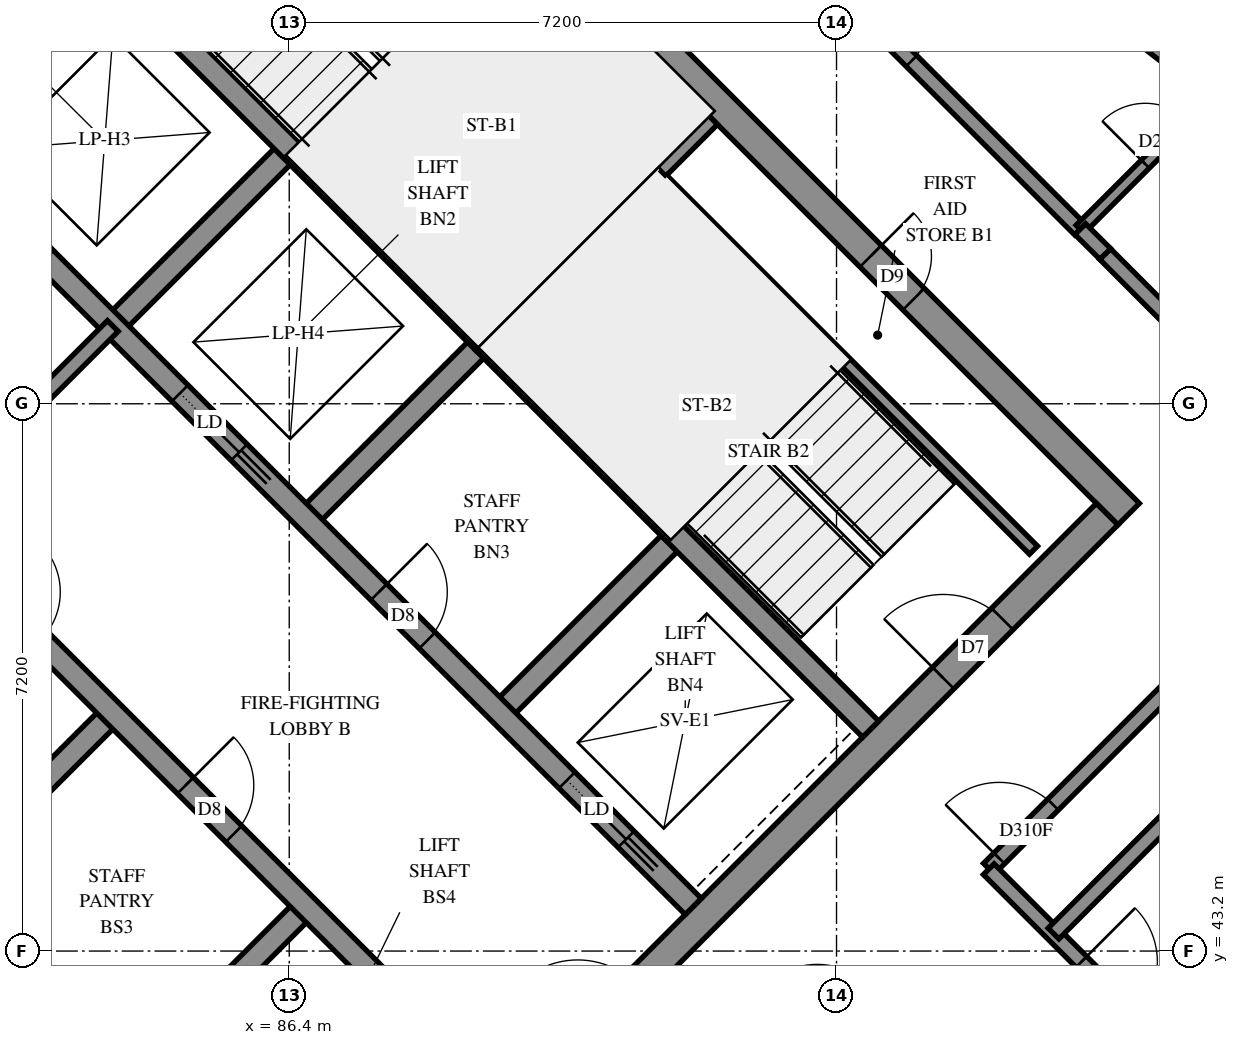
"""IFC4 building model, lengths in metres.
Left out: names, types, materials, properties, quantities, classifications, styles, units other than length and angle.
Written with IfcOpenShell. Run it as: python <this file> out.ifc"""

import sys

from ifc_helpers import new_model, si_unit, direction, frame, frame_2d, origin, place, context, subcontext, project, spatial, polyline, rectangle, outline, extrude, element, fill, save


model = new_model("IFC4")
c1 = context("Model", 3, precision=1e-05, world=origin(), true_north=direction((0.0, 1.0)))
c2 = subcontext(c1, "Body", "Model", "MODEL_VIEW")
j1 = project(units=[si_unit("LENGTHUNIT", "METRE"), si_unit("PLANEANGLEUNIT", "RADIAN")], contexts=[c1])
p1 = place(None, origin())
s1 = spatial("IfcSite", under=j1, at=p1, CompositionType="ELEMENT")
p2 = place(p1, origin())
s2 = spatial("IfcBuilding", under=s1, at=p2, CompositionType="ELEMENT")
p3 = place(p2, frame((0.0, 0.0, 257.4)))
s3 = spatial("IfcBuildingStorey", under=s2, at=p3, CompositionType="ELEMENT", Elevation=257.4)
p4 = place(p3, frame((76.23, 49.231, -0.3), z_axis=(0.0, 0.0, 1.0), x_axis=(0.7071034917, -0.7071100706, 0.0)))
e1 = element("IfcWall", 1, at=p4, inside=s3, PredefinedType="SHEAR", context=c2, shape_type="SweptSolid", body=[
    extrude(rectangle(XDim=15.2, YDim=0.4, at=frame_2d((7.6, 0.0))), origin(), (0.0, 0.0, 1.0), 2.7),
])
p5 = place(p3, frame((86.695, 59.696, -0.3), z_axis=(0.0, 0.0, 1.0), x_axis=(0.7071100706, -0.7071034917, 0.0)))
e2 = element("IfcWall", 2, at=p5, inside=s3, PredefinedType="SHEAR", context=c2, shape_type="SweptSolid", body=[
    extrude(rectangle(XDim=15.2, YDim=0.4, at=frame_2d((7.6, 0.0))), origin(), (0.0, 0.0, 1.0), 2.7),
])
p6 = place(p5, frame((10.4, 0.0, 0.3)))
e3 = element("IfcOpeningElement", 3, at=p6, cuts=e2, PredefinedType="OPENING", context=c2, shape_type="SweptSolid", body=[
    extrude(rectangle(XDim=0.8, YDim=2.1, at=frame_2d((0.4, 1.05))), frame((0.0, 0.21, 0.0), z_axis=(0.0, -1.0, 0.0), x_axis=(1.0, 0.0, 0.0)), (0.0, 0.0, 1.0), 0.42),
])
p7 = place(p3, frame((76.513, 49.231, -0.3), z_axis=(0.0, 0.0, 1.0), x_axis=(0.7071067812, 0.7071067812, 0.0)))
e4 = element("IfcWall", 4, at=p7, inside=s3, PredefinedType="SHEAR", context=c2, shape_type="SweptSolid", body=[
    extrude(rectangle(XDim=14.4, YDim=0.4, at=frame_2d((7.2, 0.0))), origin(), (0.0, 0.0, 1.0), 2.7),
])
p8 = place(p7, frame((4.55, 0.0, 0.3)))
e5 = element("IfcOpeningElement", 5, at=p8, cuts=e4, PredefinedType="OPENING", context=c2, shape_type="SweptSolid", body=[
    extrude(rectangle(XDim=1.1, YDim=2.1, at=frame_2d((0.55, 1.05))), frame((0.0, 0.21, 0.0), z_axis=(0.0, -1.0, 0.0), x_axis=(1.0, 0.0, 0.0)), (0.0, 0.0, 1.0), 0.42),
])
p9 = place(p7, frame((11.35, 0.0, 0.3)))
e6 = element("IfcOpeningElement", 6, at=p9, cuts=e4, PredefinedType="OPENING", context=c2, shape_type="SweptSolid", body=[
    extrude(rectangle(XDim=1.1, YDim=2.1, at=frame_2d((0.55, 1.05))), frame((0.0, 0.21, 0.0), z_axis=(0.0, -1.0, 0.0), x_axis=(1.0, 0.0, 0.0)), (0.0, 0.0, 1.0), 0.42),
])
p10 = place(p3, frame((86.978, 38.766, -0.3), z_axis=(0.0, 0.0, 1.0), x_axis=(0.7071067812, 0.7071067812, 0.0)))
e7 = element("IfcWall", 7, at=p10, inside=s3, PredefinedType="SHEAR", context=c2, shape_type="SweptSolid", body=[
    extrude(rectangle(XDim=14.4, YDim=0.4, at=frame_2d((7.2, 0.0))), origin(), (0.0, 0.0, 1.0), 2.7),
])
p11 = place(p10, frame((4.55, 0.0, 0.3)))
e8 = element("IfcOpeningElement", 8, at=p11, cuts=e7, PredefinedType="OPENING", context=c2, shape_type="SweptSolid", body=[
    extrude(rectangle(XDim=1.1, YDim=2.1, at=frame_2d((0.55, 1.05))), frame((0.0, 0.21, 0.0), z_axis=(0.0, -1.0, 0.0), x_axis=(1.0, 0.0, 0.0)), (0.0, 0.0, 1.0), 0.42),
])
p12 = place(p10, frame((11.35, 0.0, 0.3)))
e9 = element("IfcOpeningElement", 9, at=p12, cuts=e7, PredefinedType="OPENING", context=c2, shape_type="SweptSolid", body=[
    extrude(rectangle(XDim=1.1, YDim=2.1, at=frame_2d((0.55, 1.05))), frame((0.0, 0.21, 0.0), z_axis=(0.0, -1.0, 0.0), x_axis=(1.0, 0.0, 0.0)), (0.0, 0.0, 1.0), 0.42),
])
p13 = place(p3, frame((84.079, 51.423, 0.0), z_axis=(0.0, 0.0, 1.0), x_axis=(0.7071219326, 0.7070916295, 0.0)))
e10 = element("IfcWall", 10, at=p13, inside=s3, PredefinedType="SOLIDWALL", context=c2, shape_type="SweptSolid", body=[
    extrude(rectangle(XDim=3.3, YDim=0.3, at=frame_2d((1.65, 0.0))), origin(), (0.0, 0.0, 1.0), 3.1),
])
p14 = place(p3, frame((81.746, 43.999, 0.0), z_axis=(0.0, 0.0, 1.0), x_axis=(0.7071067812, 0.7071067812, 0.0)))
e11 = element("IfcWall", 11, at=p14, inside=s3, PredefinedType="SOLIDWALL", context=c2, shape_type="SweptSolid", body=[
    extrude(rectangle(XDim=3.3, YDim=0.3, at=frame_2d((1.65, 0.0))), origin(), (0.0, 0.0, 1.0), 3.1),
])
p15 = place(p3, frame((86.625, 48.878, 0.0), z_axis=(0.0, 0.0, 1.0), x_axis=(0.7071067812, 0.7071067812, 0.0)))
e12 = element("IfcWall", 12, at=p15, inside=s3, PredefinedType="SOLIDWALL", context=c2, shape_type="SweptSolid", body=[
    extrude(rectangle(XDim=3.3, YDim=0.3, at=frame_2d((1.65, 0.0))), origin(), (0.0, 0.0, 1.0), 3.1),
])
p16 = place(p3, frame((84.291, 41.453, 0.0), z_axis=(0.0, 0.0, 1.0), x_axis=(0.7071067812, 0.7071067812, 0.0)))
e13 = element("IfcWall", 13, at=p16, inside=s3, PredefinedType="SOLIDWALL", context=c2, shape_type="SweptSolid", body=[
    extrude(rectangle(XDim=3.3, YDim=0.3, at=frame_2d((1.65, 0.0))), origin(), (0.0, 0.0, 1.0), 3.1),
])
p17 = place(p3, frame((89.17, 46.332, 0.0), z_axis=(0.0, 0.0, 1.0), x_axis=(0.7071067812, 0.7071067812, 0.0)))
e14 = element("IfcWall", 14, at=p17, inside=s3, PredefinedType="SOLIDWALL", context=c2, shape_type="SweptSolid", body=[
    extrude(rectangle(XDim=3.3, YDim=0.3, at=frame_2d((1.65, 0.0))), origin(), (0.0, 0.0, 1.0), 3.1),
])
p18 = place(p3, frame((78.988, 51.423, 0.0), z_axis=(0.0, 0.0, 1.0), x_axis=(0.7071067812, -0.7071067812, 0.0)))
e15 = element("IfcWall", 15, at=p18, inside=s3, PredefinedType="SOLIDWALL", context=c2, shape_type="SweptSolid", body=[
    extrude(rectangle(XDim=14.4, YDim=0.3, at=frame_2d((7.2, 0.0))), origin(), (0.0, 0.0, 1.0), 3.1),
])
p19 = place(p18, frame((1.35, 0.0, 0.0)))
e16 = element("IfcOpeningElement", 16, at=p19, cuts=e15, PredefinedType="OPENING", context=c2, shape_type="SweptSolid", body=[
    extrude(rectangle(XDim=0.9, YDim=2.1, at=frame_2d((0.45, 1.05))), frame((0.0, 0.16, 0.0), z_axis=(0.0, -1.0, 0.0), x_axis=(1.0, 0.0, 0.0)), (0.0, 0.0, 1.0), 0.32),
])
p20 = place(p18, frame((4.95, 0.0, 0.0)))
e17 = element("IfcOpeningElement", 17, at=p20, cuts=e15, PredefinedType="OPENING", context=c2, shape_type="SweptSolid", body=[
    extrude(rectangle(XDim=0.9, YDim=2.1, at=frame_2d((0.45, 1.05))), frame((0.0, 0.16, 0.0), z_axis=(0.0, -1.0, 0.0), x_axis=(1.0, 0.0, 0.0)), (0.0, 0.0, 1.0), 0.32),
])
p21 = place(p18, frame((8.55, 0.0, 0.0)))
e18 = element("IfcOpeningElement", 18, at=p21, cuts=e15, PredefinedType="OPENING", context=c2, shape_type="SweptSolid", body=[
    extrude(rectangle(XDim=0.9, YDim=2.1, at=frame_2d((0.45, 1.05))), frame((0.0, 0.16, 0.0), z_axis=(0.0, -1.0, 0.0), x_axis=(1.0, 0.0, 0.0)), (0.0, 0.0, 1.0), 0.32),
])
p22 = place(p18, frame((12.05, 0.0, 0.0)))
e19 = element("IfcOpeningElement", 19, at=p22, cuts=e15, PredefinedType="OPENING", context=c2, shape_type="SweptSolid", body=[
    extrude(rectangle(XDim=1.1, YDim=2.1, at=frame_2d((0.55, 1.05))), frame((0.0, 0.16, 0.0), z_axis=(0.0, -1.0, 0.0), x_axis=(1.0, 0.0, 0.0)), (0.0, 0.0, 1.0), 0.32),
])
p23 = place(p3, frame((81.534, 53.969, 0.0), z_axis=(0.0, 0.0, 1.0), x_axis=(0.707103309, -0.7071102534, 0.0)))
e20 = element("IfcWall", 20, at=p23, inside=s3, PredefinedType="SOLIDWALL", context=c2, shape_type="SweptSolid", body=[
    extrude(rectangle(XDim=14.4, YDim=0.3, at=frame_2d((7.2, 0.0))), origin(), (0.0, 0.0, 1.0), 3.1),
])
p24 = place(p23, frame((8.55, 0.0, 0.0)))
e21 = element("IfcOpeningElement", 21, at=p24, cuts=e20, PredefinedType="OPENING", context=c2, shape_type="SweptSolid", body=[
    extrude(rectangle(XDim=0.9, YDim=2.1, at=frame_2d((0.45, 1.05))), frame((0.0, 0.16, 0.0), z_axis=(0.0, -1.0, 0.0), x_axis=(1.0, 0.0, 0.0)), (0.0, 0.0, 1.0), 0.32),
])
p25 = place(p23, frame((1.25, 0.0, 0.0)))
e22 = element("IfcOpeningElement", 22, at=p25, cuts=e20, PredefinedType="OPENING", context=c2, shape_type="SweptSolid", body=[
    extrude(rectangle(XDim=1.1, YDim=2.1, at=frame_2d((0.55, 1.05))), frame((0.0, 0.16, 0.0), z_axis=(0.0, -1.0, 0.0), x_axis=(1.0, 0.0, 0.0)), (0.0, 0.0, 1.0), 0.32),
])
p26 = place(p23, frame((4.85, 0.0, 0.0)))
e23 = element("IfcOpeningElement", 23, at=p26, cuts=e20, PredefinedType="OPENING", context=c2, shape_type="SweptSolid", body=[
    extrude(rectangle(XDim=1.1, YDim=2.1, at=frame_2d((0.55, 1.05))), frame((0.0, 0.16, 0.0), z_axis=(0.0, -1.0, 0.0), x_axis=(1.0, 0.0, 0.0)), (0.0, 0.0, 1.0), 0.32),
])
p27 = place(p23, frame((12.05, 0.0, 0.0)))
e24 = element("IfcOpeningElement", 24, at=p27, cuts=e20, PredefinedType="OPENING", context=c2, shape_type="SweptSolid", body=[
    extrude(rectangle(XDim=1.1, YDim=2.1, at=frame_2d((0.55, 1.05))), frame((0.0, 0.16, 0.0), z_axis=(0.0, -1.0, 0.0), x_axis=(1.0, 0.0, 0.0)), (0.0, 0.0, 1.0), 0.32),
])
for number, where, z_axis, x_axis in (
    (25, (83.867, 56.302, 0.0), (0.0, 0.0, 1.0), (0.707, -0.707, 0.0)),
    (26, (88.958, 51.211, 0.0), (0.0, 0.0, 1.0), (0.707, -0.707, 0.0)),
):
    element("IfcWall", number, at=place(p3, frame(where, z_axis=z_axis, x_axis=x_axis)), inside=s3, PredefinedType="SOLIDWALL", context=c2, shape_type="SweptSolid", body=[
        extrude(rectangle(XDim=7.2, YDim=0.3, at=frame_2d((3.6, 0.0))), origin(), (0.0, 0.0, 1.0), 3.1),
    ])
p28 = place(p3, frame((88.958, 51.211, 0.0), z_axis=(0.0, 0.0, 1.0), x_axis=(0.7071067812, 0.7071067812, 0.0)))
e27 = element("IfcWall", 27, at=p28, inside=s3, PredefinedType="SOLIDWALL", context=c2, shape_type="SweptSolid", body=[
    extrude(rectangle(XDim=4.2, YDim=0.3, at=frame_2d((2.1, 0.0))), origin(), (0.0, 0.0, 1.0), 3.1),
])
p29 = place(p3, frame((98.384, 54.788, 0.0), z_axis=(0.0, 0.0, 1.0), x_axis=(-0.7901691849, 0.6128887822, 0.0)))
e28 = element("IfcWall", 28, at=p29, inside=s3, PredefinedType="SOLIDWALL", context=c2, shape_type="SweptSolid", body=[
    extrude(outline(polyline([(-0.028, -0.225), (3.33, -0.225), (3.387, 0.225), (0.028, 0.225), (-0.028, -0.225)])), origin(), (0.0, 0.0, 1.0), 3.1),
])
p30 = place(p29, frame((1.249, 0.0, 0.45)))
e29 = element("IfcOpeningElement", 29, at=p30, cuts=e28, PredefinedType="OPENING", context=c2, shape_type="SweptSolid", body=[
    extrude(rectangle(XDim=1.2, YDim=2.55, at=frame_2d((0.6, 1.275))), frame((0.0, 0.235, 0.0), z_axis=(0.0, -1.0, 0.0), x_axis=(1.0, 0.0, 0.0)), (0.0, 0.0, 1.0), 0.47),
])
p31 = place(p3, frame((91.313, 53.354, 0.0), z_axis=(0.0, 0.0, 1.0), x_axis=(0.7071140275, -0.7070995348, 0.0)))
e30 = element("IfcWall", 30, at=p31, inside=s3, PredefinedType="PARTITIONING", context=c2, shape_type="SweptSolid", body=[
    extrude(rectangle(XDim=6.9, YDim=0.15, at=frame_2d((3.45, 0.0))), origin(), (0.0, 0.0, 1.0), 3.1),
])
p32 = place(p3, frame((81.534, 48.878, 0.0), z_axis=(0.0, 0.0, 1.0), x_axis=(0.707092892, 0.7071206701, 0.0)))
e31 = element("IfcWall", 31, at=p32, inside=s3, PredefinedType="PARTITIONING", context=c2, shape_type="SweptSolid", body=[
    extrude(rectangle(XDim=3.6, YDim=0.2, at=frame_2d((1.8, 0.0))), origin(), (0.0, 0.0, 1.0), 3.1),
])
p33 = place(p3, frame((95.605, 44.283, 0.0), z_axis=(0.0, 0.0, 1.0), x_axis=(0.7071067812, 0.7071067812, 0.0)))
e32 = element("IfcWall", 32, at=p33, inside=s3, PredefinedType="PARTITIONING", context=c2, shape_type="SweptSolid", body=[
    extrude(rectangle(XDim=6.8, YDim=0.2, at=frame_2d((3.4, 0.0))), origin(), (0.0, 0.0, 1.0), 3.1),
])
p34 = place(p33, frame((0.193, 0.0, 0.0)))
e33 = element("IfcOpeningElement", 33, at=p34, cuts=e32, PredefinedType="OPENING", context=c2, shape_type="SweptSolid", body=[
    extrude(rectangle(XDim=1.0, YDim=2.1, at=frame_2d((0.5, 1.05))), frame((0.0, 0.11, 0.0), z_axis=(0.0, -1.0, 0.0), x_axis=(1.0, 0.0, 0.0)), (0.0, 0.0, 1.0), 0.22),
])
p35 = place(p3, frame((95.603, 44.277, 0.0), z_axis=(0.0, 0.0, 1.0), x_axis=(0.7071067812, -0.7071067812, 0.0)))
e34 = element("IfcWall", 34, at=p35, inside=s3, PredefinedType="PARTITIONING", context=c2, shape_type="SweptSolid", body=[
    extrude(rectangle(XDim=4.797, YDim=0.2, at=frame_2d((2.398, 0.0))), origin(), (0.0, 0.0, 1.0), 3.1),
])
p36 = place(p35, frame((1.723, 0.0, 0.0)))
e35 = element("IfcOpeningElement", 35, at=p36, cuts=e34, PredefinedType="OPENING", context=c2, shape_type="SweptSolid", body=[
    extrude(rectangle(XDim=1.0, YDim=2.1, at=frame_2d((0.5, 1.05))), frame((0.0, 0.11, 0.0), z_axis=(0.0, -1.0, 0.0), x_axis=(1.0, 0.0, 0.0)), (0.0, 0.0, 1.0), 0.22),
])
p37 = place(p3, frame((93.621, 55.875, 0.0), z_axis=(0.0, 0.0, 1.0), x_axis=(0.7071067812, -0.7071067812, 0.0)))
e36 = element("IfcWall", 36, at=p37, inside=s3, PredefinedType="PARTITIONING", context=c2, shape_type="SweptSolid", body=[
    extrude(rectangle(XDim=4.5, YDim=0.2, at=frame_2d((2.25, 0.0))), origin(), (0.0, 0.0, 1.0), 3.1),
])
p38 = place(p37, frame((0.465, 0.0, 0.0)))
e37 = element("IfcOpeningElement", 37, at=p38, cuts=e36, PredefinedType="OPENING", context=c2, shape_type="SweptSolid", body=[
    extrude(rectangle(XDim=0.9, YDim=2.1, at=frame_2d((0.45, 1.05))), frame((0.0, 0.11, 0.0), z_axis=(0.0, -1.0, 0.0), x_axis=(1.0, 0.0, 0.0)), (0.0, 0.0, 1.0), 0.22),
])
p39 = place(p3, frame((96.455, 43.431, 0.0), z_axis=(0.0, 0.0, 1.0), x_axis=(0.7068409254, 0.707372537, 0.0)))
e38 = element("IfcWall", 38, at=p39, inside=s3, PredefinedType="PARTITIONING", context=c2, shape_type="SweptSolid", body=[
    extrude(rectangle(XDim=3.95, YDim=0.2, at=frame_2d((1.975, 0.0))), origin(), (0.0, 0.0, 1.0), 3.1),
])
p40 = place(p3, frame((96.806, 52.696, 0.0), z_axis=(0.0, 0.0, 1.0), x_axis=(0.7071067812, 0.7071067812, 0.0)))
e39 = element("IfcWall", 39, at=p40, inside=s3, PredefinedType="PARTITIONING", context=c2, shape_type="SweptSolid", body=[
    extrude(rectangle(XDim=2.322, YDim=0.15, at=frame_2d((1.161, 0.0))), origin(), (0.0, 0.0, 1.0), 3.1),
])
p41 = place(p40, frame((1.212, 0.0, 0.0)))
e40 = element("IfcOpeningElement", 40, at=p41, cuts=e39, PredefinedType="OPENING", context=c2, shape_type="SweptSolid", body=[
    extrude(rectangle(XDim=0.8, YDim=2.1, at=frame_2d((0.4, 1.05))), frame((0.0, 0.085, 0.0), z_axis=(0.0, -1.0, 0.0), x_axis=(1.0, 0.0, 0.0)), (0.0, 0.0, 1.0), 0.17),
])
p42 = place(p3, frame((97.134, 52.37, 0.0), z_axis=(0.0, 0.0, 1.0), x_axis=(0.7063301682, -0.7078825422, 0.0)))
e41 = element("IfcWall", 41, at=p42, inside=s3, PredefinedType="PARTITIONING", context=c2, shape_type="SweptSolid", body=[
    extrude(rectangle(XDim=1.288, YDim=0.2, at=frame_2d((0.644, 0.0))), origin(), (0.0, 0.0, 1.0), 3.1),
])
p43 = place(p3, frame((96.807, 52.697, 0.0), z_axis=(0.0, 0.0, 1.0), x_axis=(0.7092658707, -0.7049410788, 0.0)))
e42 = element("IfcWall", 42, at=p43, inside=s3, PredefinedType="PARTITIONING", context=c2, shape_type="SweptSolid", body=[
    extrude(rectangle(XDim=0.462, YDim=0.2, at=frame_2d((0.231, 0.0))), origin(), (0.0, 0.0, 1.0), 3.1),
])
p44 = place(p6, origin())
e43 = element("IfcDoor", 43, at=p44, inside=s3, OperationType="SINGLE_SWING_RIGHT", PredefinedType="DOOR", context=c2, shape_type="SweptSolid", body=[
    extrude(rectangle(XDim=0.8, YDim=2.1, at=frame_2d((0.4, 1.05))), frame((0.0, 0.025, 0.0), z_axis=(0.0, -1.0, 0.0), x_axis=(1.0, 0.0, 0.0)), (0.0, 0.0, 1.0), 0.05),
])
fill(e3, e43)
p45 = place(p12, origin())
e44 = element("IfcDoor", 44, at=p45, inside=s3, OperationType="SINGLE_SWING_RIGHT", PredefinedType="DOOR", context=c2, shape_type="SweptSolid", body=[
    extrude(rectangle(XDim=1.1, YDim=2.1, at=frame_2d((0.55, 1.05))), frame((0.0, 0.025, 0.0), z_axis=(0.0, -1.0, 0.0), x_axis=(1.0, 0.0, 0.0)), (0.0, 0.0, 1.0), 0.05),
])
fill(e9, e44)
p46 = place(p21, origin())
e45 = element("IfcDoor", 45, at=p46, inside=s3, OperationType="SINGLE_SWING_LEFT", PredefinedType="DOOR", context=c2, shape_type="SweptSolid", body=[
    extrude(rectangle(XDim=0.9, YDim=2.1, at=frame_2d((0.45, 1.05))), frame((0.0, 0.025, 0.0), z_axis=(0.0, -1.0, 0.0), x_axis=(1.0, 0.0, 0.0)), (0.0, 0.0, 1.0), 0.05),
])
fill(e18, e45)
p47 = place(p24, origin())
e46 = element("IfcDoor", 46, at=p47, inside=s3, OperationType="SINGLE_SWING_LEFT", PredefinedType="DOOR", context=c2, shape_type="SweptSolid", body=[
    extrude(rectangle(XDim=0.9, YDim=2.1, at=frame_2d((0.45, 1.05))), frame((0.0, 0.025, 0.0), z_axis=(0.0, -1.0, 0.0), x_axis=(1.0, 0.0, 0.0)), (0.0, 0.0, 1.0), 0.05),
])
fill(e21, e46)
p48 = place(p26, origin())
e47 = element("IfcDoor", 47, at=p48, inside=s3, OperationType="SLIDING_TO_RIGHT", PredefinedType="DOOR", context=c2, shape_type="SweptSolid", body=[
    extrude(rectangle(XDim=1.1, YDim=2.1, at=frame_2d((0.55, 1.05))), frame((0.0, 0.025, 0.0), z_axis=(0.0, -1.0, 0.0), x_axis=(1.0, 0.0, 0.0)), (0.0, 0.0, 1.0), 0.05),
])
fill(e23, e47)
p49 = place(p27, origin())
e48 = element("IfcDoor", 48, at=p49, inside=s3, OperationType="SLIDING_TO_RIGHT", PredefinedType="DOOR", context=c2, shape_type="SweptSolid", body=[
    extrude(rectangle(XDim=1.1, YDim=2.1, at=frame_2d((0.55, 1.05))), frame((0.0, 0.025, 0.0), z_axis=(0.0, -1.0, 0.0), x_axis=(1.0, 0.0, 0.0)), (0.0, 0.0, 1.0), 0.05),
])
fill(e24, e48)
p50 = place(p34, origin())
e49 = element("IfcDoor", 49, at=p50, inside=s3, OperationType="SINGLE_SWING_LEFT", PredefinedType="DOOR", context=c2, shape_type="SweptSolid", body=[
    extrude(rectangle(XDim=1.0, YDim=2.1, at=frame_2d((0.5, 1.05))), frame((0.0, 0.025, 0.0), z_axis=(0.0, -1.0, 0.0), x_axis=(1.0, 0.0, 0.0)), (0.0, 0.0, 1.0), 0.05),
])
fill(e33, e49)
p51 = place(p38, origin())
e50 = element("IfcDoor", 50, at=p51, inside=s3, OperationType="SINGLE_SWING_LEFT", PredefinedType="DOOR", context=c2, shape_type="SweptSolid", body=[
    extrude(rectangle(XDim=0.9, YDim=2.1, at=frame_2d((0.45, 1.05))), frame((0.0, 0.025, 0.0), z_axis=(0.0, -1.0, 0.0), x_axis=(1.0, 0.0, 0.0)), (0.0, 0.0, 1.0), 0.05),
])
fill(e37, e50)
p52 = place(p41, origin())
e51 = element("IfcDoor", 51, at=p52, inside=s3, OperationType="SINGLE_SWING_RIGHT", PredefinedType="DOOR", context=c2, shape_type="SweptSolid", body=[
    extrude(rectangle(XDim=0.8, YDim=2.1, at=frame_2d((0.4, 1.05))), frame((0.0, 0.025, 0.0), z_axis=(0.0, -1.0, 0.0), x_axis=(1.0, 0.0, 0.0)), (0.0, 0.0, 1.0), 0.05),
])
fill(e40, e51)
p53 = place(p36, origin())
e52 = element("IfcDoor", 52, at=p53, inside=s3, OperationType="SINGLE_SWING_RIGHT", PredefinedType="DOOR", context=c2, shape_type="SweptSolid", body=[
    extrude(rectangle(XDim=1.0, YDim=2.1, at=frame_2d((0.5, 1.05))), frame((0.0, 0.025, 0.0), z_axis=(0.0, -1.0, 0.0), x_axis=(1.0, 0.0, 0.0)), (0.0, 0.0, 1.0), 0.05),
])
fill(e35, e52)
save(model, sys.argv[1])
